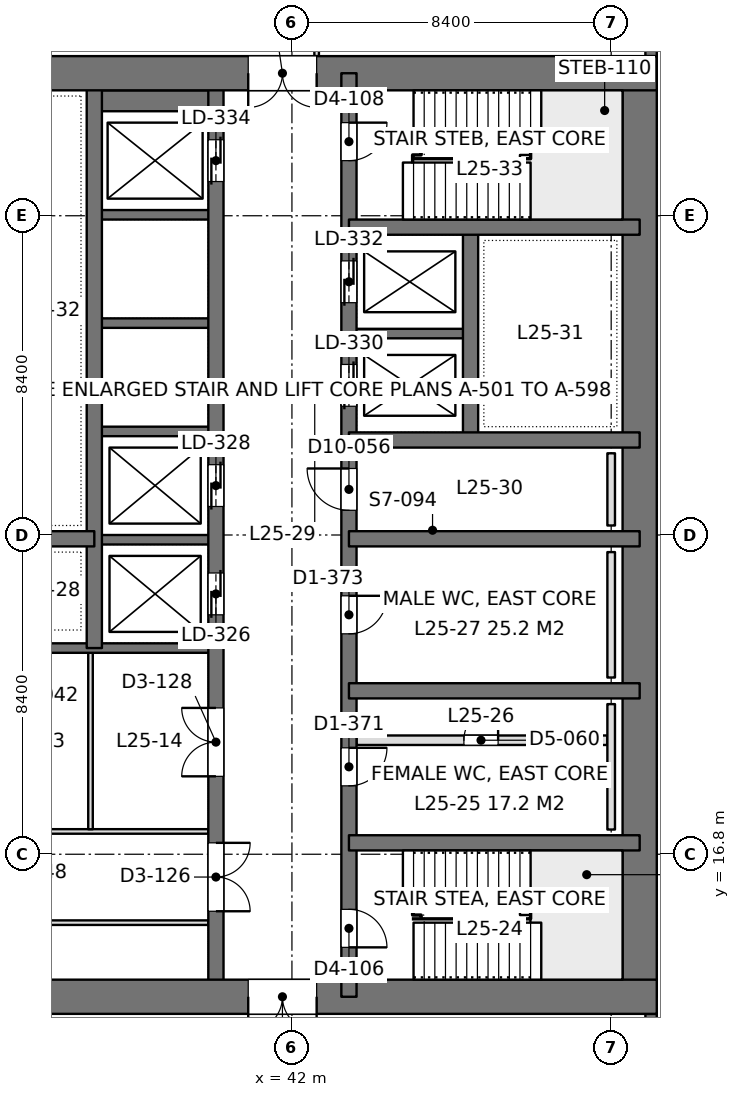
"""IFC4 building model, lengths in metres.
Left out: names, types, materials, properties, quantities, classifications, styles, units other than length and angle.
Written with IfcOpenShell. Run it as: python <this file> out.ifc"""

import sys

from ifc_helpers import new_model, si_unit, direction, frame, frame_2d, origin, place, context, subcontext, project, spatial, rectangle, extrude, element, fill, save


model = new_model("IFC4")
c1 = context("Model", 3, precision=1e-05, world=origin(), true_north=direction((0.0, 1.0)))
c2 = subcontext(c1, "Body", "Model", "MODEL_VIEW")
j1 = project(units=[si_unit("LENGTHUNIT", "METRE"), si_unit("PLANEANGLEUNIT", "RADIAN")], contexts=[c1])
p1 = place(None, origin())
s1 = spatial("IfcSite", under=j1, at=p1, CompositionType="ELEMENT")
p2 = place(p1, origin())
s2 = spatial("IfcBuilding", under=s1, at=p2, CompositionType="ELEMENT")
p3 = place(p2, frame((0.0, 0.0, 113.4)))
s3 = spatial("IfcBuildingStorey", under=s2, at=p3, CompositionType="ELEMENT", Elevation=113.4)
p4 = place(p3, frame((33.6, 13.05, 0.0), z_axis=(0.0, 0.0, 1.0), x_axis=(1.0, 0.0, 0.0)))
e1 = element("IfcWall", 1, at=p4, inside=s3, PredefinedType="SHEAR", context=c2, shape_type="SweptSolid", body=[
    extrude(rectangle(XDim=18.0, YDim=0.9, at=frame_2d((9.0, 0.0))), origin(), (0.0, 0.0, 1.0), 4.2),
])
p5 = place(p4, frame((7.25, 0.0, 0.0)))
e2 = element("IfcOpeningElement", 2, at=p5, cuts=e1, PredefinedType="OPENING", context=c2, shape_type="SweptSolid", body=[
    extrude(rectangle(XDim=1.8, YDim=2.4, at=frame_2d((0.9, 1.2))), frame((0.0, 0.46, 0.0), z_axis=(0.0, -1.0, 0.0), x_axis=(1.0, 0.0, 0.0)), (0.0, 0.0, 1.0), 0.92),
])
p6 = place(p3, frame((33.6, 37.35, 0.0), z_axis=(0.0, 0.0, 1.0), x_axis=(1.0, 0.0, 0.0)))
e3 = element("IfcWall", 3, at=p6, inside=s3, PredefinedType="SHEAR", context=c2, shape_type="SweptSolid", body=[
    extrude(rectangle(XDim=18.0, YDim=0.9, at=frame_2d((9.0, 0.0))), origin(), (0.0, 0.0, 1.0), 4.2),
])
p7 = place(p6, frame((7.25, 0.0, 0.0)))
e4 = element("IfcOpeningElement", 4, at=p7, cuts=e3, PredefinedType="OPENING", context=c2, shape_type="SweptSolid", body=[
    extrude(rectangle(XDim=1.8, YDim=2.4, at=frame_2d((0.9, 1.2))), frame((0.0, 0.46, 0.0), z_axis=(0.0, -1.0, 0.0), x_axis=(1.0, 0.0, 0.0)), (0.0, 0.0, 1.0), 0.92),
])
p8 = place(p3, frame((51.15, 13.05, 0.0), z_axis=(0.0, 0.0, 1.0), x_axis=(0.0, 1.0, 0.0)))
e5 = element("IfcWall", 5, at=p8, inside=s3, PredefinedType="SHEAR", context=c2, shape_type="SweptSolid", body=[
    extrude(rectangle(XDim=24.3, YDim=0.9, at=frame_2d((12.15, 0.0))), origin(), (0.0, 0.0, 1.0), 4.2),
])
p9 = place(p3, frame((43.5, 13.05, 0.0), z_axis=(0.0, 0.0, 1.0), x_axis=(0.0, 1.0, 0.0)))
e6 = element("IfcWall", 6, at=p9, inside=s3, PredefinedType="SHEAR", context=c2, shape_type="SweptSolid", body=[
    extrude(rectangle(XDim=24.3, YDim=0.4, at=frame_2d((12.15, 0.0))), origin(), (0.0, 0.0, 1.0), 4.2),
])
p10 = place(p9, frame((1.3, 0.0, 0.0)))
e7 = element("IfcOpeningElement", 7, at=p10, cuts=e6, PredefinedType="OPENING", context=c2, shape_type="SweptSolid", body=[
    extrude(rectangle(XDim=1.0, YDim=2.2, at=frame_2d((0.5, 1.1))), frame((0.0, 0.21, 0.0), z_axis=(0.0, -1.0, 0.0), x_axis=(1.0, 0.0, 0.0)), (0.0, 0.0, 1.0), 0.42),
])
p11 = place(p9, frame((22.0, 0.0, 0.0)))
e8 = element("IfcOpeningElement", 8, at=p11, cuts=e6, PredefinedType="OPENING", context=c2, shape_type="SweptSolid", body=[
    extrude(rectangle(XDim=1.0, YDim=2.2, at=frame_2d((0.5, 1.1))), frame((0.0, 0.21, 0.0), z_axis=(0.0, -1.0, 0.0), x_axis=(1.0, 0.0, 0.0)), (0.0, 0.0, 1.0), 0.42),
])
p12 = place(p9, frame((5.55, 0.0, 0.0)))
e9 = element("IfcOpeningElement", 9, at=p12, cuts=e6, PredefinedType="OPENING", context=c2, shape_type="SweptSolid", body=[
    extrude(rectangle(XDim=1.0, YDim=2.2, at=frame_2d((0.5, 1.1))), frame((0.0, 0.21, 0.0), z_axis=(0.0, -1.0, 0.0), x_axis=(1.0, 0.0, 0.0)), (0.0, 0.0, 1.0), 0.42),
])
p13 = place(p9, frame((9.55, 0.0, 0.0)))
e10 = element("IfcOpeningElement", 10, at=p13, cuts=e6, PredefinedType="OPENING", context=c2, shape_type="SweptSolid", body=[
    extrude(rectangle(XDim=1.0, YDim=2.2, at=frame_2d((0.5, 1.1))), frame((0.0, 0.21, 0.0), z_axis=(0.0, -1.0, 0.0), x_axis=(1.0, 0.0, 0.0)), (0.0, 0.0, 1.0), 0.42),
])
p14 = place(p9, frame((12.8, 0.0, 0.0)))
e11 = element("IfcOpeningElement", 11, at=p14, cuts=e6, PredefinedType="OPENING", context=c2, shape_type="SweptSolid", body=[
    extrude(rectangle(XDim=1.1, YDim=2.2, at=frame_2d((0.55, 1.1))), frame((0.0, 0.21, 0.0), z_axis=(0.0, -1.0, 0.0), x_axis=(1.0, 0.0, 0.0)), (0.0, 0.0, 1.0), 0.42),
])
p15 = place(p9, frame((15.538, 0.0, 0.0)))
e12 = element("IfcOpeningElement", 12, at=p15, cuts=e6, PredefinedType="OPENING", context=c2, shape_type="SweptSolid", body=[
    extrude(rectangle(XDim=1.1, YDim=2.2, at=frame_2d((0.55, 1.1))), frame((0.0, 0.21, 0.0), z_axis=(0.0, -1.0, 0.0), x_axis=(1.0, 0.0, 0.0)), (0.0, 0.0, 1.0), 0.42),
])
p16 = place(p9, frame((18.262, 0.0, 0.0)))
e13 = element("IfcOpeningElement", 13, at=p16, cuts=e6, PredefinedType="OPENING", context=c2, shape_type="SweptSolid", body=[
    extrude(rectangle(XDim=1.1, YDim=2.2, at=frame_2d((0.55, 1.1))), frame((0.0, 0.21, 0.0), z_axis=(0.0, -1.0, 0.0), x_axis=(1.0, 0.0, 0.0)), (0.0, 0.0, 1.0), 0.42),
])
p17 = place(p3, frame((40.0, 13.05, 0.0), z_axis=(0.0, 0.0, 1.0), x_axis=(0.0, 1.0, 0.0)))
e14 = element("IfcWall", 14, at=p17, inside=s3, PredefinedType="SHEAR", context=c2, shape_type="SweptSolid", body=[
    extrude(rectangle(XDim=24.3, YDim=0.4, at=frame_2d((12.15, 0.0))), origin(), (0.0, 0.0, 1.0), 4.2),
])
p18 = place(p17, frame((10.05, 0.0, 0.0)))
e15 = element("IfcOpeningElement", 15, at=p18, cuts=e14, PredefinedType="OPENING", context=c2, shape_type="SweptSolid", body=[
    extrude(rectangle(XDim=1.1, YDim=2.2, at=frame_2d((0.55, 1.1))), frame((0.0, 0.21, 0.0), z_axis=(0.0, -1.0, 0.0), x_axis=(1.0, 0.0, 0.0)), (0.0, 0.0, 1.0), 0.42),
])
p19 = place(p17, frame((12.9, 0.0, 0.0)))
e16 = element("IfcOpeningElement", 16, at=p19, cuts=e14, PredefinedType="OPENING", context=c2, shape_type="SweptSolid", body=[
    extrude(rectangle(XDim=1.1, YDim=2.2, at=frame_2d((0.55, 1.1))), frame((0.0, 0.21, 0.0), z_axis=(0.0, -1.0, 0.0), x_axis=(1.0, 0.0, 0.0)), (0.0, 0.0, 1.0), 0.42),
])
p20 = place(p17, frame((21.45, 0.0, 0.0)))
e17 = element("IfcOpeningElement", 17, at=p20, cuts=e14, PredefinedType="OPENING", context=c2, shape_type="SweptSolid", body=[
    extrude(rectangle(XDim=1.1, YDim=2.2, at=frame_2d((0.55, 1.1))), frame((0.0, 0.21, 0.0), z_axis=(0.0, -1.0, 0.0), x_axis=(1.0, 0.0, 0.0)), (0.0, 0.0, 1.0), 0.42),
])
p21 = place(p17, frame((2.25, 0.0, 0.0)))
e18 = element("IfcOpeningElement", 18, at=p21, cuts=e14, PredefinedType="OPENING", context=c2, shape_type="SweptSolid", body=[
    extrude(rectangle(XDim=1.8, YDim=2.4, at=frame_2d((0.9, 1.2))), frame((0.0, 0.21, 0.0), z_axis=(0.0, -1.0, 0.0), x_axis=(1.0, 0.0, 0.0)), (0.0, 0.0, 1.0), 0.42),
])
p22 = place(p17, frame((5.8, 0.0, 0.0)))
e19 = element("IfcOpeningElement", 19, at=p22, cuts=e14, PredefinedType="OPENING", context=c2, shape_type="SweptSolid", body=[
    extrude(rectangle(XDim=1.8, YDim=2.4, at=frame_2d((0.9, 1.2))), frame((0.0, 0.21, 0.0), z_axis=(0.0, -1.0, 0.0), x_axis=(1.0, 0.0, 0.0)), (0.0, 0.0, 1.0), 0.42),
])
p23 = place(p3, frame((36.8, 22.225, 0.0), z_axis=(0.0, 0.0, 1.0), x_axis=(0.0, 1.0, 0.0)))
e20 = element("IfcWall", 20, at=p23, inside=s3, PredefinedType="SHEAR", context=c2, shape_type="SweptSolid", body=[
    extrude(rectangle(XDim=15.125, YDim=0.4, at=frame_2d((7.562, 0.0))), origin(), (0.0, 0.0, 1.0), 4.2),
])
for number, where, z_axis, x_axis in (
    (21, (51.15, 17.1, 0.0), (0.0, 0.0, 1.0), (-1.0, 0.0, 0.0)),
    (22, (51.15, 21.1, 0.0), (0.0, 0.0, 1.0), (-1.0, 0.0, 0.0)),
    (23, (51.15, 25.1, 0.0), (0.0, 0.0, 1.0), (-1.0, 0.0, 0.0)),
    (24, (51.15, 27.7, 0.0), (0.0, 0.0, 1.0), (-1.0, 0.0, 0.0)),
    (25, (51.15, 33.3, 0.0), (0.0, 0.0, 1.0), (-1.0, 0.0, 0.0)),
):
    element("IfcWall", number, at=place(p3, frame(where, z_axis=z_axis, x_axis=x_axis)), inside=s3, PredefinedType="SHEAR", context=c2, shape_type="SweptSolid", body=[
        extrude(rectangle(XDim=7.65, YDim=0.4, at=frame_2d((3.825, 0.0))), origin(), (0.0, 0.0, 1.0), 4.2),
    ])
p24 = place(p3, frame((46.7, 27.7, 0.0), z_axis=(0.0, 0.0, 1.0), x_axis=(0.0, 1.0, 0.0)))
e26 = element("IfcWall", 26, at=p24, inside=s3, PredefinedType="SHEAR", context=c2, shape_type="SweptSolid", body=[
    extrude(rectangle(XDim=5.6, YDim=0.4, at=frame_2d((2.8, 0.0))), origin(), (0.0, 0.0, 1.0), 4.2),
])
p25 = place(p3, frame((46.7, 30.5, 0.0), z_axis=(0.0, 0.0, 1.0), x_axis=(-1.0, 0.0, 0.0)))
e27 = element("IfcWall", 27, at=p25, inside=s3, PredefinedType="SHEAR", context=c2, shape_type="SweptSolid", body=[
    extrude(rectangle(XDim=3.2, YDim=0.25, at=frame_2d((1.6, 0.0))), origin(), (0.0, 0.0, 1.0), 4.2),
])
p26 = place(p3, frame((36.8, 25.1, 0.0), z_axis=(0.0, 0.0, 1.0), x_axis=(-1.0, 0.0, 0.0)))
e28 = element("IfcWall", 28, at=p26, inside=s3, PredefinedType="SHEAR", context=c2, shape_type="SweptSolid", body=[
    extrude(rectangle(XDim=2.75, YDim=0.4, at=frame_2d((1.375, 0.0))), origin(), (0.0, 0.0, 1.0), 4.2),
])
p27 = place(p3, frame((40.0, 22.225, 0.0), z_axis=(0.0, 0.0, 1.0), x_axis=(-1.0, 0.0, 0.0)))
e29 = element("IfcWall", 29, at=p27, inside=s3, PredefinedType="SHEAR", context=c2, shape_type="SweptSolid", body=[
    extrude(rectangle(XDim=5.95, YDim=0.25, at=frame_2d((2.975, 0.0))), origin(), (0.0, 0.0, 1.0), 4.2),
])
for number, where, z_axis, x_axis in (
    (30, (40.0, 25.075, 0.0), (0.0, 0.0, 1.0), (-1.0, 0.0, 0.0)),
    (31, (40.0, 27.925, 0.0), (0.0, 0.0, 1.0), (-1.0, 0.0, 0.0)),
    (32, (40.0, 30.775, 0.0), (0.0, 0.0, 1.0), (-1.0, 0.0, 0.0)),
    (33, (40.0, 33.625, 0.0), (0.0, 0.0, 1.0), (-1.0, 0.0, 0.0)),
):
    element("IfcWall", number, at=place(p3, frame(where, z_axis=z_axis, x_axis=x_axis)), inside=s3, PredefinedType="SHEAR", context=c2, shape_type="SweptSolid", body=[
        extrude(rectangle(XDim=3.2, YDim=0.25, at=frame_2d((1.6, 0.0))), origin(), (0.0, 0.0, 1.0), 4.2),
    ])
p28 = place(p3, frame((40.0, 36.625, 0.0), z_axis=(0.0, 0.0, 1.0), x_axis=(-1.0, 0.0, 0.0)))
e34 = element("IfcWall", 34, at=p28, inside=s3, PredefinedType="SHEAR", context=c2, shape_type="SweptSolid", body=[
    extrude(rectangle(XDim=3.2, YDim=0.55, at=frame_2d((1.6, 0.0))), origin(), (0.0, 0.0, 1.0), 4.2),
])
p29 = place(p3, frame((51.45, 42.0, 0.0), z_axis=(0.0, 0.0, 1.0), x_axis=(0.0, -1.0, 0.0)))
e35 = element("IfcWall", 35, at=p29, inside=s3, PredefinedType="SOLIDWALL", context=c2, shape_type="SweptSolid", body=[
    extrude(rectangle(XDim=4.2, YDim=0.3, at=frame_2d((2.1, 0.0))), origin(), (0.0, 0.0, 1.0), 4.05),
])
p30 = place(p29, frame((0.9, 0.0, 0.9)))
e36 = element("IfcOpeningElement", 36, at=p30, cuts=e35, PredefinedType="OPENING", context=c2, shape_type="SweptSolid", body=[
    extrude(rectangle(XDim=2.4, YDim=1.9, at=frame_2d((1.2, 0.95))), frame((0.0, 0.16, 0.0), z_axis=(0.0, -1.0, 0.0), x_axis=(1.0, 0.0, 0.0)), (0.0, 0.0, 1.0), 0.32),
])
p31 = place(p3, frame((51.45, 12.6, 0.0), z_axis=(0.0, 0.0, 1.0), x_axis=(0.0, -1.0, 0.0)))
e37 = element("IfcWall", 37, at=p31, inside=s3, PredefinedType="SOLIDWALL", context=c2, shape_type="SweptSolid", body=[
    extrude(rectangle(XDim=4.2, YDim=0.3, at=frame_2d((2.1, 0.0))), origin(), (0.0, 0.0, 1.0), 4.05),
])
p32 = place(p31, frame((0.9, 0.0, 0.9)))
e38 = element("IfcOpeningElement", 38, at=p32, cuts=e37, PredefinedType="OPENING", context=c2, shape_type="SweptSolid", body=[
    extrude(rectangle(XDim=2.4, YDim=1.9, at=frame_2d((1.2, 0.95))), frame((0.0, 0.16, 0.0), z_axis=(0.0, -1.0, 0.0), x_axis=(1.0, 0.0, 0.0)), (0.0, 0.0, 1.0), 0.32),
])
p33 = place(p3, frame((33.898, 17.4, 0.0), z_axis=(0.0, 0.0, 1.0), x_axis=(1.0, 0.0, 0.0)))
e39 = element("IfcWall", 39, at=p33, inside=s3, PredefinedType="PARTITIONING", context=c2, shape_type="SweptSolid", body=[
    extrude(rectangle(XDim=5.904, YDim=0.12, at=frame_2d((2.952, 0.0))), origin(), (0.0, 0.0, 1.0), 3.55),
])
p34 = place(p33, frame((0.752, 0.0, 0.0)))
e40 = element("IfcOpeningElement", 40, at=p34, cuts=e39, PredefinedType="OPENING", context=c2, shape_type="SweptSolid", body=[
    extrude(rectangle(XDim=1.0, YDim=2.4, at=frame_2d((0.5, 1.2))), frame((0.0, 0.07, 0.0), z_axis=(0.0, -1.0, 0.0), x_axis=(1.0, 0.0, 0.0)), (0.0, 0.0, 1.0), 0.14),
])
p35 = place(p3, frame((36.7, 17.458, 0.0), z_axis=(0.0, 0.0, 1.0), x_axis=(0.0, 1.0, 0.0)))
e41 = element("IfcWall", 41, at=p35, inside=s3, PredefinedType="PARTITIONING", context=c2, shape_type="SweptSolid", body=[
    extrude(rectangle(XDim=4.644, YDim=0.12, at=frame_2d((2.322, 0.0))), origin(), (0.0, 0.0, 1.0), 3.6),
])
p36 = place(p3, frame((33.598, 15.0, 0.0), z_axis=(0.0, 0.0, 1.0), x_axis=(1.0, 0.0, 0.0)))
e42 = element("IfcWall", 42, at=p36, inside=s3, PredefinedType="PARTITIONING", context=c2, shape_type="SweptSolid", body=[
    extrude(rectangle(XDim=6.204, YDim=0.12, at=frame_2d((3.102, 0.0))), origin(), (0.0, 0.0, 1.0), 3.55),
])
p37 = place(p3, frame((42.65, 37.8, 0.0), z_axis=(0.0, 0.0, 1.0), x_axis=(0.0, 1.0, 0.0)))
e43 = element("IfcWall", 43, at=p37, inside=s3, PredefinedType="PARTITIONING", context=c2, shape_type="SweptSolid", body=[
    extrude(rectangle(XDim=2.0, YDim=0.12, at=frame_2d((1.0, 0.0))), origin(), (0.0, 0.0, 1.0), 4.05),
])
p38 = place(p3, frame((43.7, 19.8, 0.0), z_axis=(0.0, 0.0, 1.0), x_axis=(1.0, 0.0, 0.0)))
e44 = element("IfcWall", 44, at=p38, inside=s3, PredefinedType="PARTITIONING", context=c2, shape_type="SweptSolid", body=[
    extrude(rectangle(XDim=6.6, YDim=0.25, at=frame_2d((3.3, 0.0))), origin(), (0.0, 0.0, 1.0), 4.0),
])
p39 = place(p38, frame((2.825, 0.0, 0.0)))
e45 = element("IfcOpeningElement", 45, at=p39, cuts=e44, PredefinedType="OPENING", context=c2, shape_type="SweptSolid", body=[
    extrude(rectangle(XDim=0.9, YDim=2.2, at=frame_2d((0.45, 1.1))), frame((0.0, 0.135, 0.0), z_axis=(0.0, -1.0, 0.0), x_axis=(1.0, 0.0, 0.0)), (0.0, 0.0, 1.0), 0.27),
])
for number, where, z_axis, x_axis in (
    (46, (50.4, 17.45, 0.0), (0.0, 0.0, 1.0), (0.0, 1.0, 0.0)),
    (47, (50.4, 21.45, 0.0), (0.0, 0.0, 1.0), (0.0, 1.0, 0.0)),
):
    element("IfcWall", number, at=place(p3, frame(where, z_axis=z_axis, x_axis=x_axis)), inside=s3, PredefinedType="PLUMBINGWALL", context=c2, shape_type="SweptSolid", body=[
        extrude(rectangle(XDim=3.3, YDim=0.2, at=frame_2d((1.65, 0.0))), origin(), (0.0, 0.0, 1.0), 1.2),
    ])
p40 = place(p3, frame((50.4, 25.45, 0.0), z_axis=(0.0, 0.0, 1.0), x_axis=(0.0, 1.0, 0.0)))
e48 = element("IfcWall", 48, at=p40, inside=s3, PredefinedType="PLUMBINGWALL", context=c2, shape_type="SweptSolid", body=[
    extrude(rectangle(XDim=1.9, YDim=0.2, at=frame_2d((0.95, 0.0))), origin(), (0.0, 0.0, 1.0), 1.2),
])
p41 = place(p5, frame((1.8, 0.0, 0.0), z_axis=(0.0, 0.0, 1.0), x_axis=(-1.0, 0.0, 0.0)))
e49 = element("IfcDoor", 49, at=p41, inside=s3, OperationType="DOUBLE_DOOR_SINGLE_SWING", PredefinedType="DOOR", context=c2, shape_type="SweptSolid", body=[
    extrude(rectangle(XDim=1.8, YDim=2.4, at=frame_2d((0.9, 1.2))), frame((0.0, 0.025, 0.0), z_axis=(0.0, -1.0, 0.0), x_axis=(1.0, 0.0, 0.0)), (0.0, 0.0, 1.0), 0.05),
])
fill(e2, e49)
p42 = place(p7, frame((1.8, 0.0, 0.0), z_axis=(0.0, 0.0, 1.0), x_axis=(-1.0, 0.0, 0.0)))
e50 = element("IfcDoor", 50, at=p42, inside=s3, OperationType="DOUBLE_DOOR_SINGLE_SWING", PredefinedType="DOOR", context=c2, shape_type="SweptSolid", body=[
    extrude(rectangle(XDim=1.8, YDim=2.4, at=frame_2d((0.9, 1.2))), frame((0.0, 0.025, 0.0), z_axis=(0.0, -1.0, 0.0), x_axis=(1.0, 0.0, 0.0)), (0.0, 0.0, 1.0), 0.05),
])
fill(e4, e50)
p43 = place(p10, frame((1.0, 0.0, 0.0), z_axis=(0.0, 0.0, 1.0), x_axis=(-1.0, 0.0, 0.0)))
e51 = element("IfcDoor", 51, at=p43, inside=s3, OperationType="SINGLE_SWING_RIGHT", PredefinedType="DOOR", context=c2, shape_type="SweptSolid", body=[
    extrude(rectangle(XDim=1.0, YDim=2.2, at=frame_2d((0.5, 1.1))), frame((0.0, 0.025, 0.0), z_axis=(0.0, -1.0, 0.0), x_axis=(1.0, 0.0, 0.0)), (0.0, 0.0, 1.0), 0.05),
])
fill(e7, e51)
p44 = place(p11, frame((1.0, 0.0, 0.0), z_axis=(0.0, 0.0, 1.0), x_axis=(-1.0, 0.0, 0.0)))
e52 = element("IfcDoor", 52, at=p44, inside=s3, OperationType="SINGLE_SWING_LEFT", PredefinedType="DOOR", context=c2, shape_type="SweptSolid", body=[
    extrude(rectangle(XDim=1.0, YDim=2.2, at=frame_2d((0.5, 1.1))), frame((0.0, 0.025, 0.0), z_axis=(0.0, -1.0, 0.0), x_axis=(1.0, 0.0, 0.0)), (0.0, 0.0, 1.0), 0.05),
])
fill(e8, e52)
p45 = place(p12, frame((1.0, 0.0, 0.0), z_axis=(0.0, 0.0, 1.0), x_axis=(-1.0, 0.0, 0.0)))
e53 = element("IfcDoor", 53, at=p45, inside=s3, OperationType="SINGLE_SWING_LEFT", PredefinedType="DOOR", context=c2, shape_type="SweptSolid", body=[
    extrude(rectangle(XDim=1.0, YDim=2.2, at=frame_2d((0.5, 1.1))), frame((0.0, 0.025, 0.0), z_axis=(0.0, -1.0, 0.0), x_axis=(1.0, 0.0, 0.0)), (0.0, 0.0, 1.0), 0.05),
])
fill(e9, e53)
p46 = place(p13, frame((1.0, 0.0, 0.0), z_axis=(0.0, 0.0, 1.0), x_axis=(-1.0, 0.0, 0.0)))
e54 = element("IfcDoor", 54, at=p46, inside=s3, OperationType="SINGLE_SWING_LEFT", PredefinedType="DOOR", context=c2, shape_type="SweptSolid", body=[
    extrude(rectangle(XDim=1.0, YDim=2.2, at=frame_2d((0.5, 1.1))), frame((0.0, 0.025, 0.0), z_axis=(0.0, -1.0, 0.0), x_axis=(1.0, 0.0, 0.0)), (0.0, 0.0, 1.0), 0.05),
])
fill(e10, e54)
p47 = place(p14, origin())
e55 = element("IfcDoor", 55, at=p47, inside=s3, OperationType="SINGLE_SWING_RIGHT", PredefinedType="DOOR", context=c2, shape_type="SweptSolid", body=[
    extrude(rectangle(XDim=1.1, YDim=2.2, at=frame_2d((0.55, 1.1))), frame((0.0, 0.025, 0.0), z_axis=(0.0, -1.0, 0.0), x_axis=(1.0, 0.0, 0.0)), (0.0, 0.0, 1.0), 0.05),
])
fill(e11, e55)
p48 = place(p18, origin())
e56 = element("IfcDoor", 56, at=p48, inside=s3, OperationType="DOUBLE_DOOR_SLIDING", PredefinedType="DOOR", context=c2, shape_type="SweptSolid", body=[
    extrude(rectangle(XDim=1.1, YDim=2.2, at=frame_2d((0.55, 1.1))), frame((0.0, 0.025, 0.0), z_axis=(0.0, -1.0, 0.0), x_axis=(1.0, 0.0, 0.0)), (0.0, 0.0, 1.0), 0.05),
])
fill(e15, e56)
p49 = place(p19, origin())
e57 = element("IfcDoor", 57, at=p49, inside=s3, OperationType="DOUBLE_DOOR_SLIDING", PredefinedType="DOOR", context=c2, shape_type="SweptSolid", body=[
    extrude(rectangle(XDim=1.1, YDim=2.2, at=frame_2d((0.55, 1.1))), frame((0.0, 0.025, 0.0), z_axis=(0.0, -1.0, 0.0), x_axis=(1.0, 0.0, 0.0)), (0.0, 0.0, 1.0), 0.05),
])
fill(e16, e57)
p50 = place(p20, origin())
e58 = element("IfcDoor", 58, at=p50, inside=s3, OperationType="DOUBLE_DOOR_SLIDING", PredefinedType="DOOR", context=c2, shape_type="SweptSolid", body=[
    extrude(rectangle(XDim=1.1, YDim=2.2, at=frame_2d((0.55, 1.1))), frame((0.0, 0.025, 0.0), z_axis=(0.0, -1.0, 0.0), x_axis=(1.0, 0.0, 0.0)), (0.0, 0.0, 1.0), 0.05),
])
fill(e17, e58)
p51 = place(p15, origin())
e59 = element("IfcDoor", 59, at=p51, inside=s3, OperationType="DOUBLE_DOOR_SLIDING", PredefinedType="DOOR", context=c2, shape_type="SweptSolid", body=[
    extrude(rectangle(XDim=1.1, YDim=2.2, at=frame_2d((0.55, 1.1))), frame((0.0, 0.025, 0.0), z_axis=(0.0, -1.0, 0.0), x_axis=(1.0, 0.0, 0.0)), (0.0, 0.0, 1.0), 0.05),
])
fill(e12, e59)
p52 = place(p16, origin())
e60 = element("IfcDoor", 60, at=p52, inside=s3, OperationType="DOUBLE_DOOR_SLIDING", PredefinedType="DOOR", context=c2, shape_type="SweptSolid", body=[
    extrude(rectangle(XDim=1.1, YDim=2.2, at=frame_2d((0.55, 1.1))), frame((0.0, 0.025, 0.0), z_axis=(0.0, -1.0, 0.0), x_axis=(1.0, 0.0, 0.0)), (0.0, 0.0, 1.0), 0.05),
])
fill(e13, e60)
p53 = place(p21, frame((1.8, 0.0, 0.0), z_axis=(0.0, 0.0, 1.0), x_axis=(-1.0, 0.0, 0.0)))
e61 = element("IfcDoor", 61, at=p53, inside=s3, OperationType="DOUBLE_DOOR_SINGLE_SWING", PredefinedType="DOOR", context=c2, shape_type="SweptSolid", body=[
    extrude(rectangle(XDim=1.8, YDim=2.4, at=frame_2d((0.9, 1.2))), frame((0.0, 0.025, 0.0), z_axis=(0.0, -1.0, 0.0), x_axis=(1.0, 0.0, 0.0)), (0.0, 0.0, 1.0), 0.05),
])
fill(e18, e61)
p54 = place(p22, origin())
e62 = element("IfcDoor", 62, at=p54, inside=s3, OperationType="DOUBLE_DOOR_SINGLE_SWING", PredefinedType="DOOR", context=c2, shape_type="SweptSolid", body=[
    extrude(rectangle(XDim=1.8, YDim=2.4, at=frame_2d((0.9, 1.2))), frame((0.0, 0.025, 0.0), z_axis=(0.0, -1.0, 0.0), x_axis=(1.0, 0.0, 0.0)), (0.0, 0.0, 1.0), 0.05),
])
fill(e19, e62)
p55 = place(p39, origin())
e63 = element("IfcDoor", 63, at=p55, inside=s3, OperationType="SINGLE_SWING_RIGHT", PredefinedType="DOOR", context=c2, shape_type="SweptSolid", body=[
    extrude(rectangle(XDim=0.9, YDim=2.2, at=frame_2d((0.45, 1.1))), frame((0.0, 0.025, 0.0), z_axis=(0.0, -1.0, 0.0), x_axis=(1.0, 0.0, 0.0)), (0.0, 0.0, 1.0), 0.05),
])
fill(e45, e63)
save(model, sys.argv[1])
